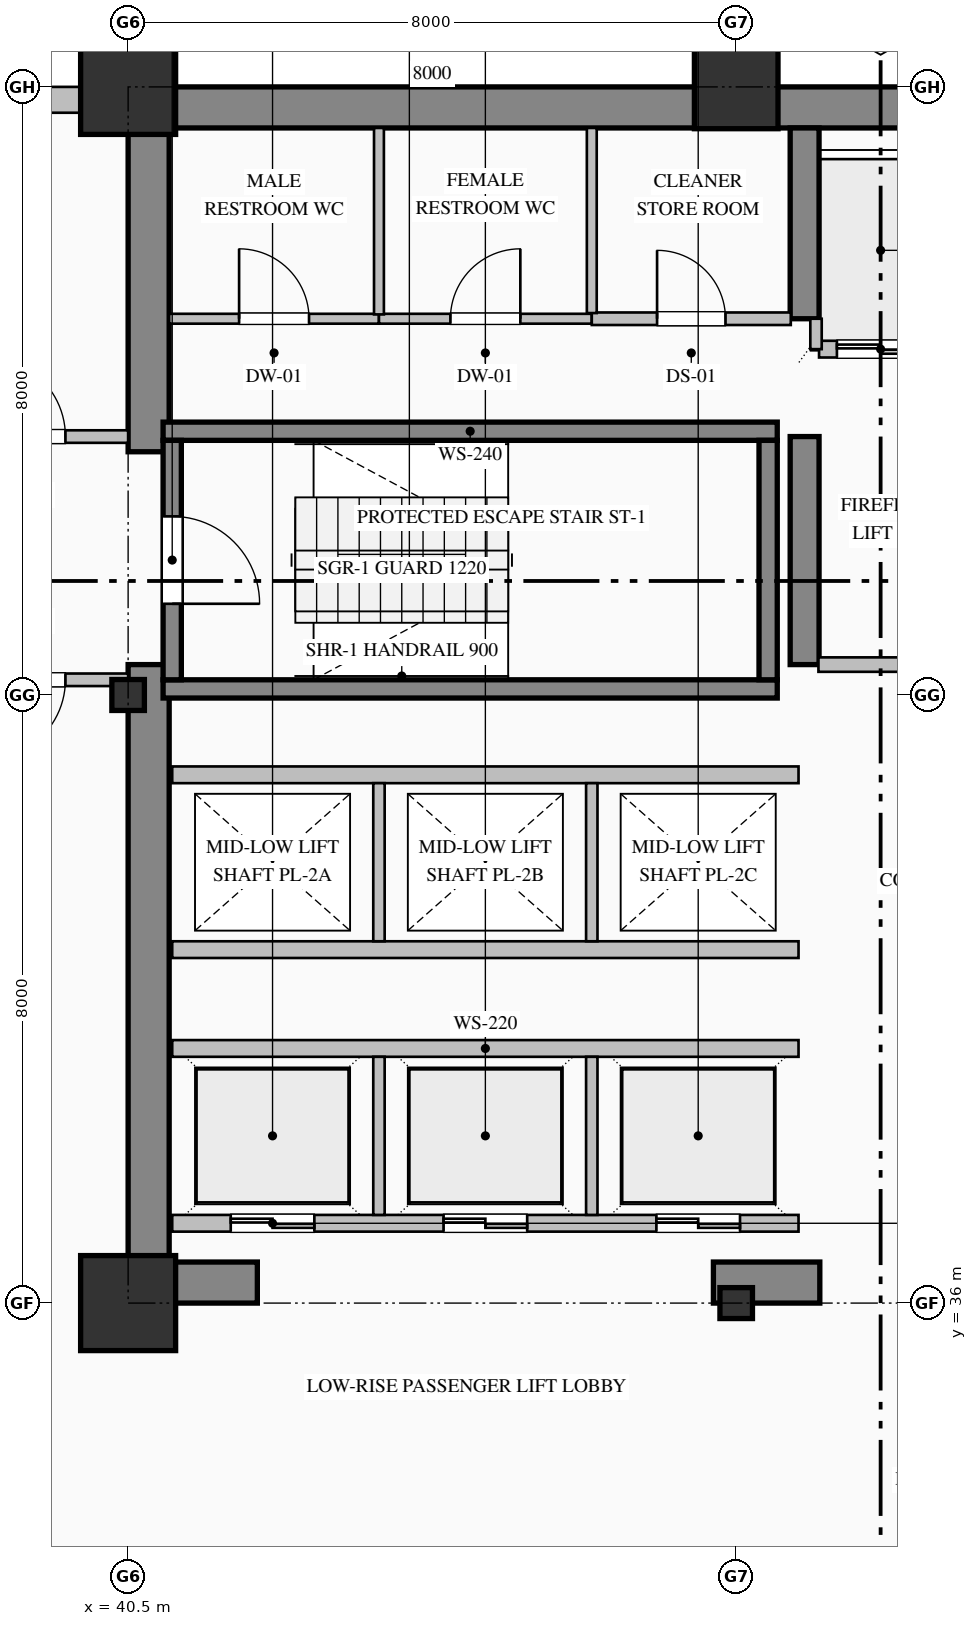
"""IFC4 building model, lengths in metres.
Left out: names, types, materials, properties, quantities, classifications, styles, units other than length and angle.
Written with IfcOpenShell. Run it as: python <this file> out.ifc"""

import sys

from ifc_helpers import new_model, si_unit, direction, frame, frame_2d, origin, origin_2d, place, context, subcontext, project, spatial, rectangle, hollow_rectangle, i_section, extrude, element, fill, save


model = new_model("IFC4")
c1 = context("Model", 3, precision=1e-05, world=origin(), true_north=direction((0.0, 1.0)))
c2 = subcontext(c1, "Body", "Model", "MODEL_VIEW")
j1 = project(units=[si_unit("LENGTHUNIT", "METRE"), si_unit("PLANEANGLEUNIT", "RADIAN")], contexts=[c1])
p1 = place(None, origin())
s1 = spatial("IfcSite", under=j1, at=p1, CompositionType="ELEMENT")
p2 = place(p1, origin())
s2 = spatial("IfcBuilding", under=s1, at=p2, CompositionType="ELEMENT")
p3 = place(p2, frame((0.0, 0.0, 72.2)))
s3 = spatial("IfcBuildingStorey", under=s2, at=p3, CompositionType="ELEMENT", Elevation=72.2)
p4 = place(p3, frame((40.5, 51.73, 0.0), z_axis=(0.0, 0.0, 1.0), x_axis=(1.0, 0.0, 0.0)))
e1 = element("IfcWall", 1, at=p4, inside=s3, PredefinedType="SHEAR", context=c2, shape_type="SweptSolid", body=[
    extrude(rectangle(XDim=23.5, YDim=0.54, at=frame_2d((11.75, 0.0))), origin(), (0.0, 0.0, 1.0), 3.75),
])
p5 = place(p3, frame((40.77, 36.54, 0.0), z_axis=(0.0, 0.0, 1.0), x_axis=(0.0, 1.0, 0.0)))
e2 = element("IfcWall", 2, at=p5, inside=s3, PredefinedType="SHEAR", context=c2, shape_type="SweptSolid", body=[
    extrude(rectangle(XDim=7.86, YDim=0.54, at=frame_2d((3.93, 0.0))), origin(), (0.0, 0.0, 1.0), 3.75),
])
p6 = place(p3, frame((40.77, 47.2, 0.0), z_axis=(0.0, 0.0, 1.0), x_axis=(0.0, 1.0, 0.0)))
e3 = element("IfcWall", 3, at=p6, inside=s3, PredefinedType="SHEAR", context=c2, shape_type="SweptSolid", body=[
    extrude(rectangle(XDim=4.26, YDim=0.54, at=frame_2d((2.13, 0.0))), origin(), (0.0, 0.0, 1.0), 3.75),
])
p7 = place(p3, frame((40.5, 36.27, 0.0), z_axis=(0.0, 0.0, 1.0), x_axis=(1.0, 0.0, 0.0)))
e4 = element("IfcWall", 4, at=p7, inside=s3, PredefinedType="SHEAR", context=c2, shape_type="SweptSolid", body=[
    extrude(rectangle(XDim=1.7, YDim=0.54, at=frame_2d((0.85, 0.0))), origin(), (0.0, 0.0, 1.0), 3.75),
])
p8 = place(p3, frame((48.2, 36.27, 0.0), z_axis=(0.0, 0.0, 1.0), x_axis=(1.0, 0.0, 0.0)))
e5 = element("IfcWall", 5, at=p8, inside=s3, PredefinedType="SHEAR", context=c2, shape_type="SweptSolid", body=[
    extrude(rectangle(XDim=1.4, YDim=0.54, at=frame_2d((0.7, 0.0))), origin(), (0.0, 0.0, 1.0), 3.75),
])
p9 = place(p3, frame((49.4, 44.4, 0.0), z_axis=(0.0, 0.0, 1.0), x_axis=(0.0, 1.0, 0.0)))
e6 = element("IfcWall", 6, at=p9, inside=s3, PredefinedType="SHEAR", context=c2, shape_type="SweptSolid", body=[
    extrude(rectangle(XDim=3.0, YDim=0.38, at=frame_2d((1.5, 0.0))), origin(), (0.0, 0.0, 1.0), 3.75),
])
p10 = place(p3, frame((49.4, 48.95, 0.0), z_axis=(0.0, 0.0, 1.0), x_axis=(0.0, 1.0, 0.0)))
e7 = element("IfcWall", 7, at=p10, inside=s3, PredefinedType="SHEAR", context=c2, shape_type="SweptSolid", body=[
    extrude(rectangle(XDim=2.51, YDim=0.38, at=frame_2d((1.255, 0.0))), origin(), (0.0, 0.0, 1.0), 3.75),
])
p11 = place(p3, frame((40.5, 36.0, 0.0), z_axis=(0.0, 0.0, 1.0), x_axis=(1.0, 0.0, 0.0)))
e8 = element("IfcColumn", 8, at=p11, inside=s3, PredefinedType="COLUMN", context=c2, shape_type="SweptSolid", body=[
    extrude(hollow_rectangle(XDim=1.25, YDim=1.25, WallThickness=0.045, at=origin_2d()), origin(), (0.0, 0.0, 1.0), 4.0),
])
p12 = place(p3, frame((40.5, 44.0, 0.0), z_axis=(0.0, 0.0, 1.0), x_axis=(1.0, 0.0, 0.0)))
e9 = element("IfcColumn", 9, at=p12, inside=s3, PredefinedType="COLUMN", context=c2, shape_type="SweptSolid", body=[
    extrude(i_section(OverallWidth=0.407, OverallDepth=0.428, WebThickness=0.02, FlangeThickness=0.035, FilletRadius=0.022, at=origin_2d()), origin(), (0.0, 0.0, 1.0), 4.0),
])
p13 = place(p3, frame((40.5, 52.0, 0.0), z_axis=(0.0, 0.0, 1.0), x_axis=(1.0, 0.0, 0.0)))
e10 = element("IfcColumn", 10, at=p13, inside=s3, PredefinedType="COLUMN", context=c2, shape_type="SweptSolid", body=[
    extrude(hollow_rectangle(XDim=1.25, YDim=1.25, WallThickness=0.045, at=origin_2d()), origin(), (0.0, 0.0, 1.0), 4.0),
])
p14 = place(p3, frame((48.5, 36.0, 0.0), z_axis=(0.0, 0.0, 1.0), x_axis=(1.0, 0.0, 0.0)))
e11 = element("IfcColumn", 11, at=p14, inside=s3, PredefinedType="COLUMN", context=c2, shape_type="SweptSolid", body=[
    extrude(i_section(OverallWidth=0.407, OverallDepth=0.428, WebThickness=0.02, FlangeThickness=0.035, FilletRadius=0.022, at=origin_2d()), origin(), (0.0, 0.0, 1.0), 4.0),
])
p15 = place(p3, frame((48.5, 52.0, 0.0), z_axis=(0.0, 0.0, 1.0), x_axis=(1.0, 0.0, 0.0)))
e12 = element("IfcColumn", 12, at=p15, inside=s3, PredefinedType="COLUMN", context=c2, shape_type="SweptSolid", body=[
    extrude(hollow_rectangle(XDim=1.1, YDim=1.1, WallThickness=0.04, at=origin_2d()), origin(), (0.0, 0.0, 1.0), 4.0),
])
p16 = place(p3, frame((4.0, 51.83, 0.0), z_axis=(0.0, 0.0, 1.0), x_axis=(1.0, 0.0, 0.0)))
e13 = element("IfcWall", 13, at=p16, inside=s3, PredefinedType="SOLIDWALL", context=c2, shape_type="SweptSolid", body=[
    extrude(rectangle(XDim=36.52, YDim=0.34, at=frame_2d((18.26, 0.0))), origin(), (0.0, 0.0, 1.0), 3.25),
])
p17 = place(p16, frame((6.0, 0.0, 0.8)))
e14 = element("IfcOpeningElement", 14, at=p17, cuts=e13, PredefinedType="OPENING", context=c2, shape_type="SweptSolid", body=[
    extrude(rectangle(XDim=2.4, YDim=2.15, at=frame_2d((1.2, 1.075))), frame((0.0, 0.18, 0.0), z_axis=(0.0, -1.0, 0.0), x_axis=(1.0, 0.0, 0.0)), (0.0, 0.0, 1.0), 0.36),
])
p18 = place(p16, frame((16.8, 0.0, 0.8)))
e15 = element("IfcOpeningElement", 15, at=p18, cuts=e13, PredefinedType="OPENING", context=c2, shape_type="SweptSolid", body=[
    extrude(rectangle(XDim=2.4, YDim=2.15, at=frame_2d((1.2, 1.075))), frame((0.0, 0.18, 0.0), z_axis=(0.0, -1.0, 0.0), x_axis=(1.0, 0.0, 0.0)), (0.0, 0.0, 1.0), 0.36),
])
p19 = place(p16, frame((24.15, 0.0, 0.85)))
e16 = element("IfcOpeningElement", 16, at=p19, cuts=e13, PredefinedType="OPENING", context=c2, shape_type="SweptSolid", body=[
    extrude(rectangle(XDim=2.1, YDim=2.05, at=frame_2d((1.05, 1.025))), frame((0.0, 0.18, 0.0), z_axis=(0.0, -1.0, 0.0), x_axis=(1.0, 0.0, 0.0)), (0.0, 0.0, 1.0), 0.36),
])
for number, where, z_axis, x_axis in (
    (17, (40.96, 47.47, 0.0), (0.0, 0.0, 1.0), (1.0, 0.0, 0.0)),
    (18, (49.04, 44.08, 0.0), (0.0, 0.0, 1.0), (-1.0, 0.0, 0.0)),
):
    element("IfcWall", number, at=place(p3, frame(where, z_axis=z_axis, x_axis=x_axis)), inside=s3, PredefinedType="SOLIDWALL", context=c2, shape_type="SweptSolid", body=[
        extrude(rectangle(XDim=8.08, YDim=0.24, at=frame_2d((4.04, 0.0))), origin(), (0.0, 0.0, 1.0), 4.0),
    ])
p20 = place(p3, frame((41.08, 47.35, 0.0), z_axis=(0.0, 0.0, 1.0), x_axis=(0.0, -1.0, 0.0)))
e19 = element("IfcWall", 19, at=p20, inside=s3, PredefinedType="SOLIDWALL", context=c2, shape_type="SweptSolid", body=[
    extrude(rectangle(XDim=3.15, YDim=0.24, at=frame_2d((1.575, 0.0))), origin(), (0.0, 0.0, 1.0), 4.0),
])
p21 = place(p20, frame((1.0, 0.0, 0.0)))
e20 = element("IfcOpeningElement", 20, at=p21, cuts=e19, PredefinedType="OPENING", context=c2, shape_type="SweptSolid", body=[
    extrude(rectangle(XDim=1.15, YDim=2.2, at=frame_2d((0.575, 1.1))), frame((0.0, 0.13, 0.0), z_axis=(0.0, -1.0, 0.0), x_axis=(1.0, 0.0, 0.0)), (0.0, 0.0, 1.0), 0.26),
])
p22 = place(p3, frame((48.92, 44.2, 0.0), z_axis=(0.0, 0.0, 1.0), x_axis=(0.0, 1.0, 0.0)))
e21 = element("IfcWall", 21, at=p22, inside=s3, PredefinedType="SOLIDWALL", context=c2, shape_type="SweptSolid", body=[
    extrude(rectangle(XDim=3.15, YDim=0.24, at=frame_2d((1.575, 0.0))), origin(), (0.0, 0.0, 1.0), 4.0),
])
p23 = place(p3, frame((54.71, 48.55, 0.0), z_axis=(0.0, 0.0, 1.0), x_axis=(-1.0, 0.0, 0.0)))
e22 = element("IfcWall", 22, at=p23, inside=s3, PredefinedType="PARTITIONING", context=c2, shape_type="SweptSolid", body=[
    extrude(rectangle(XDim=5.12, YDim=0.22, at=frame_2d((2.56, 0.0))), origin(), (0.0, 0.0, 1.0), 3.75),
])
p24 = place(p23, frame((3.735, 0.0, 0.0)))
e23 = element("IfcOpeningElement", 23, at=p24, cuts=e22, PredefinedType="OPENING", context=c2, shape_type="SweptSolid", body=[
    extrude(rectangle(XDim=1.15, YDim=2.2, at=frame_2d((0.575, 1.1))), frame((0.0, 0.12, 0.0), z_axis=(0.0, -1.0, 0.0), x_axis=(1.0, 0.0, 0.0)), (0.0, 0.0, 1.0), 0.24),
])
p25 = place(p23, frame((0.935, 0.0, 0.0)))
e24 = element("IfcOpeningElement", 24, at=p25, cuts=e22, PredefinedType="OPENING", context=c2, shape_type="SweptSolid", body=[
    extrude(rectangle(XDim=1.15, YDim=2.2, at=frame_2d((0.575, 1.1))), frame((0.0, 0.12, 0.0), z_axis=(0.0, -1.0, 0.0), x_axis=(1.0, 0.0, 0.0)), (0.0, 0.0, 1.0), 0.24),
])
p26 = place(p3, frame((49.55, 48.55, 0.0), z_axis=(0.0, 0.0, 1.0), x_axis=(0.0, 1.0, 0.0)))
e25 = element("IfcWall", 25, at=p26, inside=s3, PredefinedType="PARTITIONING", context=c2, shape_type="SweptSolid", body=[
    extrude(rectangle(XDim=0.4, YDim=0.15, at=frame_2d((0.2, 0.0))), origin(), (0.0, 0.0, 1.0), 3.75),
])
p27 = place(p3, frame((49.32, 37.05, 0.0), z_axis=(0.0, 0.0, 1.0), x_axis=(-1.0, 0.0, 0.0)))
e26 = element("IfcWall", 26, at=p27, inside=s3, PredefinedType="PARTITIONING", context=c2, shape_type="SweptSolid", body=[
    extrude(rectangle(XDim=8.24, YDim=0.22, at=frame_2d((4.12, 0.0))), origin(), (0.0, 0.0, 1.0), 3.75),
])
p28 = place(p27, frame((6.37, 0.0, 0.0)))
e27 = element("IfcOpeningElement", 27, at=p28, cuts=e26, PredefinedType="OPENING", context=c2, shape_type="SweptSolid", body=[
    extrude(rectangle(XDim=1.1, YDim=2.2, at=frame_2d((0.55, 1.1))), frame((0.0, 0.12, 0.0), z_axis=(0.0, -1.0, 0.0), x_axis=(1.0, 0.0, 0.0)), (0.0, 0.0, 1.0), 0.24),
])
p29 = place(p27, frame((3.57, 0.0, 0.0)))
e28 = element("IfcOpeningElement", 28, at=p29, cuts=e26, PredefinedType="OPENING", context=c2, shape_type="SweptSolid", body=[
    extrude(rectangle(XDim=1.1, YDim=2.2, at=frame_2d((0.55, 1.1))), frame((0.0, 0.12, 0.0), z_axis=(0.0, -1.0, 0.0), x_axis=(1.0, 0.0, 0.0)), (0.0, 0.0, 1.0), 0.24),
])
p30 = place(p27, frame((0.77, 0.0, 0.0)))
e29 = element("IfcOpeningElement", 29, at=p30, cuts=e26, PredefinedType="OPENING", context=c2, shape_type="SweptSolid", body=[
    extrude(rectangle(XDim=1.1, YDim=2.2, at=frame_2d((0.55, 1.1))), frame((0.0, 0.12, 0.0), z_axis=(0.0, -1.0, 0.0), x_axis=(1.0, 0.0, 0.0)), (0.0, 0.0, 1.0), 0.24),
])
p31 = place(p3, frame((41.08, 39.35, 0.0), z_axis=(0.0, 0.0, 1.0), x_axis=(1.0, 0.0, 0.0)))
e30 = element("IfcWall", 30, at=p31, inside=s3, PredefinedType="PARTITIONING", context=c2, shape_type="SweptSolid", body=[
    extrude(rectangle(XDim=8.24, YDim=0.22, at=frame_2d((4.12, 0.0))), origin(), (0.0, 0.0, 1.0), 3.75),
])
for number, where, z_axis, x_axis in (
    (31, (43.8, 37.16, 0.0), (0.0, 0.0, 1.0), (0.0, 1.0, 0.0)),
    (32, (46.6, 37.16, 0.0), (0.0, 0.0, 1.0), (0.0, 1.0, 0.0)),
):
    element("IfcWall", number, at=place(p3, frame(where, z_axis=z_axis, x_axis=x_axis)), inside=s3, PredefinedType="PARTITIONING", context=c2, shape_type="SweptSolid", body=[
        extrude(rectangle(XDim=2.08, YDim=0.15, at=frame_2d((1.04, 0.0))), origin(), (0.0, 0.0, 1.0), 3.75),
    ])
for number, where, z_axis, x_axis in (
    (33, (49.32, 40.65, 0.0), (0.0, 0.0, 1.0), (-1.0, 0.0, 0.0)),
    (34, (41.08, 42.95, 0.0), (0.0, 0.0, 1.0), (1.0, 0.0, 0.0)),
):
    element("IfcWall", number, at=place(p3, frame(where, z_axis=z_axis, x_axis=x_axis)), inside=s3, PredefinedType="PARTITIONING", context=c2, shape_type="SweptSolid", body=[
        extrude(rectangle(XDim=8.24, YDim=0.22, at=frame_2d((4.12, 0.0))), origin(), (0.0, 0.0, 1.0), 3.75),
    ])
for number, where, z_axis, x_axis in (
    (35, (43.8, 40.76, 0.0), (0.0, 0.0, 1.0), (0.0, 1.0, 0.0)),
    (36, (46.6, 40.76, 0.0), (0.0, 0.0, 1.0), (0.0, 1.0, 0.0)),
):
    element("IfcWall", number, at=place(p3, frame(where, z_axis=z_axis, x_axis=x_axis)), inside=s3, PredefinedType="PARTITIONING", context=c2, shape_type="SweptSolid", body=[
        extrude(rectangle(XDim=2.08, YDim=0.15, at=frame_2d((1.04, 0.0))), origin(), (0.0, 0.0, 1.0), 3.75),
    ])
p32 = place(p3, frame((37.8, 47.4, 0.0), z_axis=(0.0, 0.0, 1.0), x_axis=(1.0, 0.0, 0.0)))
e37 = element("IfcWall", 37, at=p32, inside=s3, PredefinedType="PARTITIONING", context=c2, shape_type="SweptSolid", body=[
    extrude(rectangle(XDim=2.7, YDim=0.165, at=frame_2d((1.35, 0.0))), origin(), (0.0, 0.0, 1.0), 3.75),
])
p33 = place(p32, frame((0.825, 0.0, 0.0)))
e38 = element("IfcOpeningElement", 38, at=p33, cuts=e37, PredefinedType="OPENING", context=c2, shape_type="SweptSolid", body=[
    extrude(rectangle(XDim=1.05, YDim=2.15, at=frame_2d((0.525, 1.075))), frame((0.0, 0.093, 0.0), z_axis=(0.0, -1.0, 0.0), x_axis=(1.0, 0.0, 0.0)), (0.0, 0.0, 1.0), 0.185),
])
p34 = place(p3, frame((40.5, 44.2, 0.0), z_axis=(0.0, 0.0, 1.0), x_axis=(-1.0, 0.0, 0.0)))
e39 = element("IfcWall", 39, at=p34, inside=s3, PredefinedType="PARTITIONING", context=c2, shape_type="SweptSolid", body=[
    extrude(rectangle(XDim=2.7, YDim=0.165, at=frame_2d((1.35, 0.0))), origin(), (0.0, 0.0, 1.0), 3.75),
])
p35 = place(p34, frame((0.825, 0.0, 0.0)))
e40 = element("IfcOpeningElement", 40, at=p35, cuts=e39, PredefinedType="OPENING", context=c2, shape_type="SweptSolid", body=[
    extrude(rectangle(XDim=1.05, YDim=2.15, at=frame_2d((0.525, 1.075))), frame((0.0, 0.093, 0.0), z_axis=(0.0, -1.0, 0.0), x_axis=(1.0, 0.0, 0.0)), (0.0, 0.0, 1.0), 0.185),
])
p36 = place(p3, frame((41.04, 48.95, 0.0), z_axis=(0.0, 0.0, 1.0), x_axis=(1.0, 0.0, 0.0)))
e41 = element("IfcWall", 41, at=p36, inside=s3, PredefinedType="PARTITIONING", context=c2, shape_type="SweptSolid", body=[
    extrude(rectangle(XDim=2.76, YDim=0.13, at=frame_2d((1.38, 0.0))), origin(), (0.0, 0.0, 1.0), 3.75),
])
p37 = place(p36, frame((0.92, 0.0, 0.0)))
e42 = element("IfcOpeningElement", 42, at=p37, cuts=e41, PredefinedType="OPENING", context=c2, shape_type="SweptSolid", body=[
    extrude(rectangle(XDim=0.92, YDim=2.15, at=frame_2d((0.46, 1.075))), frame((0.0, 0.075, 0.0), z_axis=(0.0, -1.0, 0.0), x_axis=(1.0, 0.0, 0.0)), (0.0, 0.0, 1.0), 0.15),
])
p38 = place(p3, frame((43.8, 48.95, 0.0), z_axis=(0.0, 0.0, 1.0), x_axis=(1.0, 0.0, 0.0)))
e43 = element("IfcWall", 43, at=p38, inside=s3, PredefinedType="PARTITIONING", context=c2, shape_type="SweptSolid", body=[
    extrude(rectangle(XDim=2.8, YDim=0.13, at=frame_2d((1.4, 0.0))), origin(), (0.0, 0.0, 1.0), 3.75),
])
p39 = place(p38, frame((0.94, 0.0, 0.0)))
e44 = element("IfcOpeningElement", 44, at=p39, cuts=e43, PredefinedType="OPENING", context=c2, shape_type="SweptSolid", body=[
    extrude(rectangle(XDim=0.92, YDim=2.15, at=frame_2d((0.46, 1.075))), frame((0.0, 0.075, 0.0), z_axis=(0.0, -1.0, 0.0), x_axis=(1.0, 0.0, 0.0)), (0.0, 0.0, 1.0), 0.15),
])
p40 = place(p3, frame((46.6, 48.95, 0.0), z_axis=(0.0, 0.0, 1.0), x_axis=(1.0, 0.0, 0.0)))
e45 = element("IfcWall", 45, at=p40, inside=s3, PredefinedType="PARTITIONING", context=c2, shape_type="SweptSolid", body=[
    extrude(rectangle(XDim=2.618, YDim=0.165, at=frame_2d((1.309, 0.0))), origin(), (0.0, 0.0, 1.0), 3.75),
])
p41 = place(p40, frame((0.859, 0.0, 0.0)))
e46 = element("IfcOpeningElement", 46, at=p41, cuts=e45, PredefinedType="OPENING", context=c2, shape_type="SweptSolid", body=[
    extrude(rectangle(XDim=0.9, YDim=2.15, at=frame_2d((0.45, 1.075))), frame((0.0, 0.093, 0.0), z_axis=(0.0, -1.0, 0.0), x_axis=(1.0, 0.0, 0.0)), (0.0, 0.0, 1.0), 0.185),
])
p42 = place(p3, frame((54.718, 44.4, 0.0), z_axis=(0.0, 0.0, 1.0), x_axis=(-1.0, 0.0, 0.0)))
e47 = element("IfcWall", 47, at=p42, inside=s3, PredefinedType="PARTITIONING", context=c2, shape_type="SweptSolid", body=[
    extrude(rectangle(XDim=5.136, YDim=0.19, at=frame_2d((2.568, 0.0))), origin(), (0.0, 0.0, 1.0), 3.75),
])
p43 = place(p42, frame((2.043, 0.0, 0.0)))
e48 = element("IfcOpeningElement", 48, at=p43, cuts=e47, PredefinedType="OPENING", context=c2, shape_type="SweptSolid", body=[
    extrude(rectangle(XDim=1.05, YDim=2.15, at=frame_2d((0.525, 1.075))), frame((0.0, 0.105, 0.0), z_axis=(0.0, -1.0, 0.0), x_axis=(1.0, 0.0, 0.0)), (0.0, 0.0, 1.0), 0.21),
])
p44 = place(p3, frame((43.8, 51.46, 0.0), z_axis=(0.0, 0.0, 1.0), x_axis=(0.0, -1.0, 0.0)))
e49 = element("IfcWall", 49, at=p44, inside=s3, PredefinedType="PARTITIONING", context=c2, shape_type="SweptSolid", body=[
    extrude(rectangle(XDim=2.453, YDim=0.13, at=frame_2d((1.227, 0.0))), origin(), (0.0, 0.0, 1.0), 3.75),
])
p45 = place(p3, frame((46.6, 51.46, 0.0), z_axis=(0.0, 0.0, 1.0), x_axis=(0.0, -1.0, 0.0)))
e50 = element("IfcWall", 50, at=p45, inside=s3, PredefinedType="PARTITIONING", context=c2, shape_type="SweptSolid", body=[
    extrude(rectangle(XDim=2.436, YDim=0.13, at=frame_2d((1.218, 0.0))), origin(), (0.0, 0.0, 1.0), 3.75),
])
p46 = place(p21, origin())
e51 = element("IfcDoor", 51, at=p46, inside=s3, OperationType="SINGLE_SWING_RIGHT", PredefinedType="DOOR", context=c2, shape_type="SweptSolid", body=[
    extrude(rectangle(XDim=1.15, YDim=2.2, at=frame_2d((0.575, 1.1))), frame((0.0, 0.025, 0.0), z_axis=(0.0, -1.0, 0.0), x_axis=(1.0, 0.0, 0.0)), (0.0, 0.0, 1.0), 0.05),
])
fill(e20, e51)
p47 = place(p24, origin())
e52 = element("IfcDoor", 52, at=p47, inside=s3, OperationType="DOUBLE_DOOR_SLIDING", PredefinedType="DOOR", context=c2, shape_type="SweptSolid", body=[
    extrude(rectangle(XDim=1.15, YDim=2.2, at=frame_2d((0.575, 1.1))), frame((0.0, 0.025, 0.0), z_axis=(0.0, -1.0, 0.0), x_axis=(1.0, 0.0, 0.0)), (0.0, 0.0, 1.0), 0.05),
])
fill(e23, e52)
p48 = place(p28, origin())
e53 = element("IfcDoor", 53, at=p48, inside=s3, OperationType="DOUBLE_DOOR_SLIDING", PredefinedType="DOOR", context=c2, shape_type="SweptSolid", body=[
    extrude(rectangle(XDim=1.1, YDim=2.2, at=frame_2d((0.55, 1.1))), frame((0.0, 0.025, 0.0), z_axis=(0.0, -1.0, 0.0), x_axis=(1.0, 0.0, 0.0)), (0.0, 0.0, 1.0), 0.05),
])
fill(e27, e53)
p49 = place(p29, origin())
e54 = element("IfcDoor", 54, at=p49, inside=s3, OperationType="DOUBLE_DOOR_SLIDING", PredefinedType="DOOR", context=c2, shape_type="SweptSolid", body=[
    extrude(rectangle(XDim=1.1, YDim=2.2, at=frame_2d((0.55, 1.1))), frame((0.0, 0.025, 0.0), z_axis=(0.0, -1.0, 0.0), x_axis=(1.0, 0.0, 0.0)), (0.0, 0.0, 1.0), 0.05),
])
fill(e28, e54)
p50 = place(p30, origin())
e55 = element("IfcDoor", 55, at=p50, inside=s3, OperationType="DOUBLE_DOOR_SLIDING", PredefinedType="DOOR", context=c2, shape_type="SweptSolid", body=[
    extrude(rectangle(XDim=1.1, YDim=2.2, at=frame_2d((0.55, 1.1))), frame((0.0, 0.025, 0.0), z_axis=(0.0, -1.0, 0.0), x_axis=(1.0, 0.0, 0.0)), (0.0, 0.0, 1.0), 0.05),
])
fill(e29, e55)
p51 = place(p33, origin())
e56 = element("IfcDoor", 56, at=p51, inside=s3, OperationType="SINGLE_SWING_LEFT", PredefinedType="DOOR", context=c2, shape_type="SweptSolid", body=[
    extrude(rectangle(XDim=1.05, YDim=2.15, at=frame_2d((0.525, 1.075))), frame((0.0, 0.025, 0.0), z_axis=(0.0, -1.0, 0.0), x_axis=(1.0, 0.0, 0.0)), (0.0, 0.0, 1.0), 0.05),
])
fill(e38, e56)
p52 = place(p35, origin())
e57 = element("IfcDoor", 57, at=p52, inside=s3, OperationType="SINGLE_SWING_RIGHT", PredefinedType="DOOR", context=c2, shape_type="SweptSolid", body=[
    extrude(rectangle(XDim=1.05, YDim=2.15, at=frame_2d((0.525, 1.075))), frame((0.0, 0.025, 0.0), z_axis=(0.0, -1.0, 0.0), x_axis=(1.0, 0.0, 0.0)), (0.0, 0.0, 1.0), 0.05),
])
fill(e40, e57)
p53 = place(p37, origin())
e58 = element("IfcDoor", 58, at=p53, inside=s3, OperationType="SINGLE_SWING_LEFT", PredefinedType="DOOR", context=c2, shape_type="SweptSolid", body=[
    extrude(rectangle(XDim=0.92, YDim=2.15, at=frame_2d((0.46, 1.075))), frame((0.0, 0.025, 0.0), z_axis=(0.0, -1.0, 0.0), x_axis=(1.0, 0.0, 0.0)), (0.0, 0.0, 1.0), 0.05),
])
fill(e42, e58)
p54 = place(p39, origin())
e59 = element("IfcDoor", 59, at=p54, inside=s3, OperationType="SINGLE_SWING_RIGHT", PredefinedType="DOOR", context=c2, shape_type="SweptSolid", body=[
    extrude(rectangle(XDim=0.92, YDim=2.15, at=frame_2d((0.46, 1.075))), frame((0.0, 0.025, 0.0), z_axis=(0.0, -1.0, 0.0), x_axis=(1.0, 0.0, 0.0)), (0.0, 0.0, 1.0), 0.05),
])
fill(e44, e59)
p55 = place(p41, origin())
e60 = element("IfcDoor", 60, at=p55, inside=s3, OperationType="SINGLE_SWING_LEFT", PredefinedType="DOOR", context=c2, shape_type="SweptSolid", body=[
    extrude(rectangle(XDim=0.9, YDim=2.15, at=frame_2d((0.45, 1.075))), frame((0.0, 0.025, 0.0), z_axis=(0.0, -1.0, 0.0), x_axis=(1.0, 0.0, 0.0)), (0.0, 0.0, 1.0), 0.05),
])
fill(e46, e60)
save(model, sys.argv[1])
